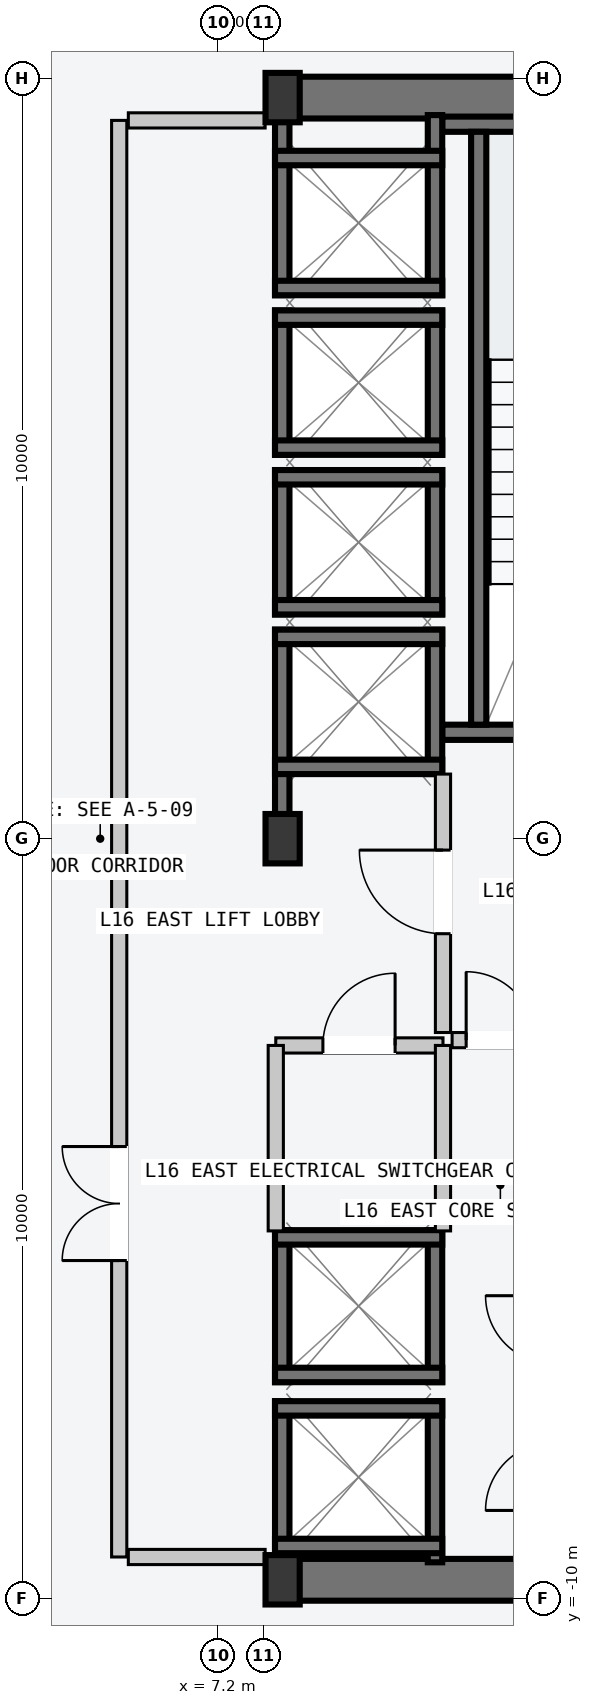
"""IFC4 building model, lengths in metres.
Left out: names, types, materials, properties, quantities, classifications, styles, units other than length and angle.
Written with IfcOpenShell. Run it as: python <this file> out.ifc"""

import sys

from ifc_helpers import new_model, si_unit, direction, frame, frame_2d, origin, origin_2d, place, context, subcontext, project, spatial, rectangle, i_section, extrude, element, fill, save


model = new_model("IFC4")
c1 = context("Model", 3, precision=1e-05, world=origin(), true_north=direction((0.0, 1.0)))
c2 = subcontext(c1, "Body", "Model", "MODEL_VIEW")
j1 = project(units=[si_unit("LENGTHUNIT", "METRE"), si_unit("PLANEANGLEUNIT", "RADIAN")], contexts=[c1])
p1 = place(None, origin())
s1 = spatial("IfcSite", under=j1, at=p1, CompositionType="ELEMENT")
p2 = place(p1, origin())
s2 = spatial("IfcBuilding", under=s1, at=p2, CompositionType="ELEMENT")
p3 = place(p2, frame((0.0, 0.0, 63.6)))
s3 = spatial("IfcBuildingStorey", under=s2, at=p3, CompositionType="ELEMENT", Elevation=63.6)
for number, where, z_axis, x_axis in (
    (1, (8.07, -9.75, -0.2), (0.0, 0.0, 1.0), (1.0, 0.0, 0.0)),
    (2, (8.07, 9.75, -0.2), (0.0, 0.0, 1.0), (1.0, 0.0, 0.0)),
):
    element("IfcWall", number, at=place(p3, frame(where, z_axis=z_axis, x_axis=x_axis)), inside=s3, PredefinedType="SHEAR", context=c2, shape_type="SweptSolid", body=[
        extrude(rectangle(XDim=6.46, YDim=0.55, at=frame_2d((3.23, 0.0))), origin(), (0.0, 0.0, 1.0), 3.6),
    ])
p4 = place(p3, frame((10.15, 1.4, -0.2), z_axis=(0.0, 0.0, 1.0), x_axis=(1.0, 0.0, 0.0)))
e3 = element("IfcWall", 3, at=p4, inside=s3, PredefinedType="SOLIDWALL", context=c2, shape_type="SweptSolid", body=[
    extrude(rectangle(XDim=4.1, YDim=0.2, at=frame_2d((2.05, 0.0))), origin(), (0.0, 0.0, 1.0), 3.6),
])
p5 = place(p4, frame((1.5, 0.0, 0.2)))
e4 = element("IfcOpeningElement", 4, at=p5, cuts=e3, PredefinedType="OPENING", context=c2, shape_type="SweptSolid", body=[
    extrude(rectangle(XDim=1.12, YDim=2.18, at=frame_2d((0.56, 1.09))), frame((0.0, 0.11, 0.0), z_axis=(0.0, -1.0, 0.0), x_axis=(1.0, 0.0, 0.0)), (0.0, 0.0, 1.0), 0.22),
])
p6 = place(p3, frame((10.15, 9.4, -0.2), z_axis=(0.0, 0.0, 1.0), x_axis=(1.0, 0.0, 0.0)))
e5 = element("IfcWall", 5, at=p6, inside=s3, PredefinedType="SOLIDWALL", context=c2, shape_type="SweptSolid", body=[
    extrude(rectangle(XDim=4.1, YDim=0.2, at=frame_2d((2.05, 0.0))), origin(), (0.0, 0.0, 1.0), 3.6),
])
p7 = place(p3, frame((10.63, 1.5, -0.2), z_axis=(0.0, 0.0, 1.0), x_axis=(0.0, 1.0, 0.0)))
e6 = element("IfcWall", 6, at=p7, inside=s3, PredefinedType="SOLIDWALL", context=c2, shape_type="SweptSolid", body=[
    extrude(rectangle(XDim=7.8, YDim=0.2, at=frame_2d((3.9, 0.0))), origin(), (0.0, 0.0, 1.0), 3.6),
])
for number, where, z_axis, x_axis in (
    (7, (8.05, -9.75, 0.0), (0.0, 0.0, 1.0), (1.0, 0.0, 0.0)),
    (8, (8.05, 0.0, 0.0), (0.0, 0.0, 1.0), (1.0, 0.0, 0.0)),
    (9, (8.05, 9.75, 0.0), (0.0, 0.0, 1.0), (1.0, 0.0, 0.0)),
):
    element("IfcColumn", number, at=place(p3, frame(where, z_axis=z_axis, x_axis=x_axis)), inside=s3, PredefinedType="COLUMN", context=c2, shape_type="SweptSolid", body=[
        extrude(i_section(OverallWidth=0.45, OverallDepth=0.65, WebThickness=0.025, FlangeThickness=0.04, at=origin_2d()), origin(), (0.0, 0.0, 1.0), 3.6),
    ])
p8 = place(p3, frame((8.045, 0.21, -0.2), z_axis=(0.0, 0.0, 1.0), x_axis=(0.0, 1.0, 0.0)))
e10 = element("IfcWall", 10, at=p8, inside=s3, PredefinedType="SOLIDWALL", context=c2, shape_type="SweptSolid", body=[
    extrude(rectangle(XDim=2.54, YDim=0.19, at=frame_2d((1.27, 0.0))), origin(), (0.0, 0.0, 1.0), 3.6),
])
p9 = place(p3, frame((10.055, 0.85, -0.2), z_axis=(0.0, 0.0, 1.0), x_axis=(0.0, 1.0, 0.0)))
e11 = element("IfcWall", 11, at=p9, inside=s3, PredefinedType="SOLIDWALL", context=c2, shape_type="SweptSolid", body=[
    extrude(rectangle(XDim=1.9, YDim=0.19, at=frame_2d((0.95, 0.0))), origin(), (0.0, 0.0, 1.0), 3.6),
])
for number, where, z_axis, x_axis in (
    (12, (7.95, 2.655, -0.2), (0.0, 0.0, 1.0), (1.0, 0.0, 0.0)),
    (13, (7.95, 0.945, -0.2), (0.0, 0.0, 1.0), (1.0, 0.0, 0.0)),
):
    element("IfcWall", number, at=place(p3, frame(where, z_axis=z_axis, x_axis=x_axis)), inside=s3, PredefinedType="SOLIDWALL", context=c2, shape_type="SweptSolid", body=[
        extrude(rectangle(XDim=2.2, YDim=0.19, at=frame_2d((1.1, 0.0))), origin(), (0.0, 0.0, 1.0), 3.6),
    ])
for number, where, z_axis, x_axis in (
    (14, (8.045, 2.95, -0.2), (0.0, 0.0, 1.0), (0.0, 1.0, 0.0)),
    (15, (10.055, 2.95, -0.2), (0.0, 0.0, 1.0), (0.0, 1.0, 0.0)),
):
    element("IfcWall", number, at=place(p3, frame(where, z_axis=z_axis, x_axis=x_axis)), inside=s3, PredefinedType="SOLIDWALL", context=c2, shape_type="SweptSolid", body=[
        extrude(rectangle(XDim=1.9, YDim=0.19, at=frame_2d((0.95, 0.0))), origin(), (0.0, 0.0, 1.0), 3.6),
    ])
for number, where, z_axis, x_axis in (
    (16, (7.95, 4.755, -0.2), (0.0, 0.0, 1.0), (1.0, 0.0, 0.0)),
    (17, (7.95, 3.045, -0.2), (0.0, 0.0, 1.0), (1.0, 0.0, 0.0)),
):
    element("IfcWall", number, at=place(p3, frame(where, z_axis=z_axis, x_axis=x_axis)), inside=s3, PredefinedType="SOLIDWALL", context=c2, shape_type="SweptSolid", body=[
        extrude(rectangle(XDim=2.2, YDim=0.19, at=frame_2d((1.1, 0.0))), origin(), (0.0, 0.0, 1.0), 3.6),
    ])
for number, where, z_axis, x_axis in (
    (18, (8.045, 5.05, -0.2), (0.0, 0.0, 1.0), (0.0, 1.0, 0.0)),
    (19, (10.055, 5.05, -0.2), (0.0, 0.0, 1.0), (0.0, 1.0, 0.0)),
):
    element("IfcWall", number, at=place(p3, frame(where, z_axis=z_axis, x_axis=x_axis)), inside=s3, PredefinedType="SOLIDWALL", context=c2, shape_type="SweptSolid", body=[
        extrude(rectangle(XDim=1.9, YDim=0.19, at=frame_2d((0.95, 0.0))), origin(), (0.0, 0.0, 1.0), 3.6),
    ])
for number, where, z_axis, x_axis in (
    (20, (7.95, 6.855, -0.2), (0.0, 0.0, 1.0), (1.0, 0.0, 0.0)),
    (21, (7.95, 5.145, -0.2), (0.0, 0.0, 1.0), (1.0, 0.0, 0.0)),
):
    element("IfcWall", number, at=place(p3, frame(where, z_axis=z_axis, x_axis=x_axis)), inside=s3, PredefinedType="SOLIDWALL", context=c2, shape_type="SweptSolid", body=[
        extrude(rectangle(XDim=2.2, YDim=0.19, at=frame_2d((1.1, 0.0))), origin(), (0.0, 0.0, 1.0), 3.6),
    ])
for number, where, z_axis, x_axis in (
    (22, (8.045, 7.15, -0.2), (0.0, 0.0, 1.0), (0.0, 1.0, 0.0)),
    (23, (10.055, 7.15, -0.2), (0.0, 0.0, 1.0), (0.0, 1.0, 0.0)),
):
    element("IfcWall", number, at=place(p3, frame(where, z_axis=z_axis, x_axis=x_axis)), inside=s3, PredefinedType="SOLIDWALL", context=c2, shape_type="SweptSolid", body=[
        extrude(rectangle(XDim=2.37, YDim=0.19, at=frame_2d((1.185, 0.0))), origin(), (0.0, 0.0, 1.0), 3.6),
    ])
for number, where, z_axis, x_axis in (
    (24, (7.95, 8.955, -0.2), (0.0, 0.0, 1.0), (1.0, 0.0, 0.0)),
    (25, (7.95, 7.245, -0.2), (0.0, 0.0, 1.0), (1.0, 0.0, 0.0)),
):
    element("IfcWall", number, at=place(p3, frame(where, z_axis=z_axis, x_axis=x_axis)), inside=s3, PredefinedType="SOLIDWALL", context=c2, shape_type="SweptSolid", body=[
        extrude(rectangle(XDim=2.2, YDim=0.19, at=frame_2d((1.1, 0.0))), origin(), (0.0, 0.0, 1.0), 3.6),
    ])
for number, where, z_axis, x_axis in (
    (26, (8.045, -9.52, -0.2), (0.0, 0.0, 1.0), (0.0, 1.0, 0.0)),
    (27, (10.055, -9.52, -0.2), (0.0, 0.0, 1.0), (0.0, 1.0, 0.0)),
):
    element("IfcWall", number, at=place(p3, frame(where, z_axis=z_axis, x_axis=x_axis)), inside=s3, PredefinedType="SOLIDWALL", context=c2, shape_type="SweptSolid", body=[
        extrude(rectangle(XDim=2.12, YDim=0.19, at=frame_2d((1.06, 0.0))), origin(), (0.0, 0.0, 1.0), 3.6),
    ])
for number, where, z_axis, x_axis in (
    (28, (7.95, -7.495, -0.2), (0.0, 0.0, 1.0), (1.0, 0.0, 0.0)),
    (29, (7.95, -9.305, -0.2), (0.0, 0.0, 1.0), (1.0, 0.0, 0.0)),
):
    element("IfcWall", number, at=place(p3, frame(where, z_axis=z_axis, x_axis=x_axis)), inside=s3, PredefinedType="SOLIDWALL", context=c2, shape_type="SweptSolid", body=[
        extrude(rectangle(XDim=2.2, YDim=0.19, at=frame_2d((1.1, 0.0))), origin(), (0.0, 0.0, 1.0), 3.6),
    ])
for number, where, z_axis, x_axis in (
    (30, (8.045, -7.15, -0.2), (0.0, 0.0, 1.0), (0.0, 1.0, 0.0)),
    (31, (10.055, -7.15, -0.2), (0.0, 0.0, 1.0), (0.0, 1.0, 0.0)),
):
    element("IfcWall", number, at=place(p3, frame(where, z_axis=z_axis, x_axis=x_axis)), inside=s3, PredefinedType="SOLIDWALL", context=c2, shape_type="SweptSolid", body=[
        extrude(rectangle(XDim=2.0, YDim=0.19, at=frame_2d((1.0, 0.0))), origin(), (0.0, 0.0, 1.0), 3.6),
    ])
for number, where, z_axis, x_axis in (
    (32, (7.95, -5.245, -0.2), (0.0, 0.0, 1.0), (1.0, 0.0, 0.0)),
    (33, (7.95, -7.055, -0.2), (0.0, 0.0, 1.0), (1.0, 0.0, 0.0)),
):
    element("IfcWall", number, at=place(p3, frame(where, z_axis=z_axis, x_axis=x_axis)), inside=s3, PredefinedType="SOLIDWALL", context=c2, shape_type="SweptSolid", body=[
        extrude(rectangle(XDim=2.2, YDim=0.19, at=frame_2d((1.1, 0.0))), origin(), (0.0, 0.0, 1.0), 3.6),
    ])
p10 = place(p3, frame((5.9, -9.45, 0.0), z_axis=(0.0, 0.0, 1.0), x_axis=(0.0, 1.0, 0.0)))
e34 = element("IfcWall", 34, at=p10, inside=s3, PredefinedType="PARTITIONING", context=c2, shape_type="SweptSolid", body=[
    extrude(rectangle(XDim=18.9, YDim=0.2, at=frame_2d((9.45, 0.0))), origin(), (0.0, 0.0, 1.0), 3.4),
])
p11 = place(p10, frame((3.9, 0.0, 0.0)))
e35 = element("IfcOpeningElement", 35, at=p11, cuts=e34, PredefinedType="OPENING", context=c2, shape_type="SweptSolid", body=[
    extrude(rectangle(XDim=1.5, YDim=2.2, at=frame_2d((0.75, 1.1))), frame((0.0, 0.11, 0.0), z_axis=(0.0, -1.0, 0.0), x_axis=(1.0, 0.0, 0.0)), (0.0, 0.0, 1.0), 0.22),
])
for number, where, z_axis, x_axis in (
    (36, (6.02, -9.45, 0.0), (0.0, 0.0, 1.0), (1.0, 0.0, 0.0)),
    (37, (6.02, 9.45, 0.0), (0.0, 0.0, 1.0), (1.0, 0.0, 0.0)),
):
    element("IfcWall", number, at=place(p3, frame(where, z_axis=z_axis, x_axis=x_axis)), inside=s3, PredefinedType="PARTITIONING", context=c2, shape_type="SweptSolid", body=[
        extrude(rectangle(XDim=1.8, YDim=0.2, at=frame_2d((0.9, 0.0))), origin(), (0.0, 0.0, 1.0), 3.4),
    ])
p12 = place(p3, frame((10.16, -2.55, 0.0), z_axis=(0.0, 0.0, 1.0), x_axis=(0.0, 1.0, 0.0)))
e38 = element("IfcWall", 38, at=p12, inside=s3, PredefinedType="PARTITIONING", context=c2, shape_type="SweptSolid", body=[
    extrude(rectangle(XDim=3.4, YDim=0.2, at=frame_2d((1.7, 0.0))), origin(), (0.0, 0.0, 1.0), 3.4),
])
p13 = place(p12, frame((1.3, 0.0, 0.0)))
e39 = element("IfcOpeningElement", 39, at=p13, cuts=e38, PredefinedType="OPENING", context=c2, shape_type="SweptSolid", body=[
    extrude(rectangle(XDim=1.1, YDim=2.15, at=frame_2d((0.55, 1.075))), frame((0.0, 0.11, 0.0), z_axis=(0.0, -1.0, 0.0), x_axis=(1.0, 0.0, 0.0)), (0.0, 0.0, 1.0), 0.22),
])
p14 = place(p3, frame((10.28, -2.65, 0.0), z_axis=(0.0, 0.0, 1.0), x_axis=(1.0, 0.0, 0.0)))
e40 = element("IfcWall", 40, at=p14, inside=s3, PredefinedType="PARTITIONING", context=c2, shape_type="SweptSolid", body=[
    extrude(rectangle(XDim=1.27, YDim=0.2, at=frame_2d((0.635, 0.0))), origin(), (0.0, 0.0, 1.0), 3.4),
])
p15 = place(p14, frame((0.185, 0.0, 0.0)))
e41 = element("IfcOpeningElement", 41, at=p15, cuts=e40, PredefinedType="OPENING", context=c2, shape_type="SweptSolid", body=[
    extrude(rectangle(XDim=0.9, YDim=2.15, at=frame_2d((0.45, 1.075))), frame((0.0, 0.11, 0.0), z_axis=(0.0, -1.0, 0.0), x_axis=(1.0, 0.0, 0.0)), (0.0, 0.0, 1.0), 0.22),
])
p16 = place(p3, frame((7.96, -2.72, 0.0), z_axis=(0.0, 0.0, 1.0), x_axis=(1.0, 0.0, 0.0)))
e42 = element("IfcWall", 42, at=p16, inside=s3, PredefinedType="PARTITIONING", context=c2, shape_type="SweptSolid", body=[
    extrude(rectangle(XDim=2.2, YDim=0.2, at=frame_2d((1.1, 0.0))), origin(), (0.0, 0.0, 1.0), 3.4),
])
p17 = place(p16, frame((0.62, 0.0, 0.0)))
e43 = element("IfcOpeningElement", 43, at=p17, cuts=e42, PredefinedType="OPENING", context=c2, shape_type="SweptSolid", body=[
    extrude(rectangle(XDim=0.95, YDim=2.1, at=frame_2d((0.475, 1.05))), frame((0.0, 0.11, 0.0), z_axis=(0.0, -1.0, 0.0), x_axis=(1.0, 0.0, 0.0)), (0.0, 0.0, 1.0), 0.22),
])
for number, where, z_axis, x_axis in (
    (44, (7.96, -5.16, 0.0), (0.0, 0.0, 1.0), (0.0, 1.0, 0.0)),
    (45, (10.16, -5.16, 0.0), (0.0, 0.0, 1.0), (0.0, 1.0, 0.0)),
):
    element("IfcWall", number, at=place(p3, frame(where, z_axis=z_axis, x_axis=x_axis)), inside=s3, PredefinedType="PARTITIONING", context=c2, shape_type="SweptSolid", body=[
        extrude(rectangle(XDim=2.44, YDim=0.2, at=frame_2d((1.22, 0.0))), origin(), (0.0, 0.0, 1.0), 3.4),
    ])
p18 = place(p11, origin())
e46 = element("IfcDoor", 46, at=p18, inside=s3, OperationType="DOUBLE_DOOR_SINGLE_SWING", PredefinedType="DOOR", context=c2, shape_type="SweptSolid", body=[
    extrude(rectangle(XDim=1.5, YDim=2.2, at=frame_2d((0.75, 1.1))), frame((0.0, 0.025, 0.0), z_axis=(0.0, -1.0, 0.0), x_axis=(1.0, 0.0, 0.0)), (0.0, 0.0, 1.0), 0.05),
])
fill(e35, e46)
p19 = place(p13, origin())
e47 = element("IfcDoor", 47, at=p19, inside=s3, OperationType="SINGLE_SWING_RIGHT", PredefinedType="DOOR", context=c2, shape_type="SweptSolid", body=[
    extrude(rectangle(XDim=1.1, YDim=2.15, at=frame_2d((0.55, 1.075))), frame((0.0, 0.025, 0.0), z_axis=(0.0, -1.0, 0.0), x_axis=(1.0, 0.0, 0.0)), (0.0, 0.0, 1.0), 0.05),
])
fill(e39, e47)
p20 = place(p15, origin())
e48 = element("IfcDoor", 48, at=p20, inside=s3, OperationType="SINGLE_SWING_LEFT", PredefinedType="DOOR", context=c2, shape_type="SweptSolid", body=[
    extrude(rectangle(XDim=0.9, YDim=2.15, at=frame_2d((0.45, 1.075))), frame((0.0, 0.025, 0.0), z_axis=(0.0, -1.0, 0.0), x_axis=(1.0, 0.0, 0.0)), (0.0, 0.0, 1.0), 0.05),
])
fill(e41, e48)
p21 = place(p17, origin())
e49 = element("IfcDoor", 49, at=p21, inside=s3, OperationType="SINGLE_SWING_RIGHT", PredefinedType="DOOR", context=c2, shape_type="SweptSolid", body=[
    extrude(rectangle(XDim=0.95, YDim=2.1, at=frame_2d((0.475, 1.05))), frame((0.0, 0.025, 0.0), z_axis=(0.0, -1.0, 0.0), x_axis=(1.0, 0.0, 0.0)), (0.0, 0.0, 1.0), 0.05),
])
fill(e43, e49)
save(model, sys.argv[1])
